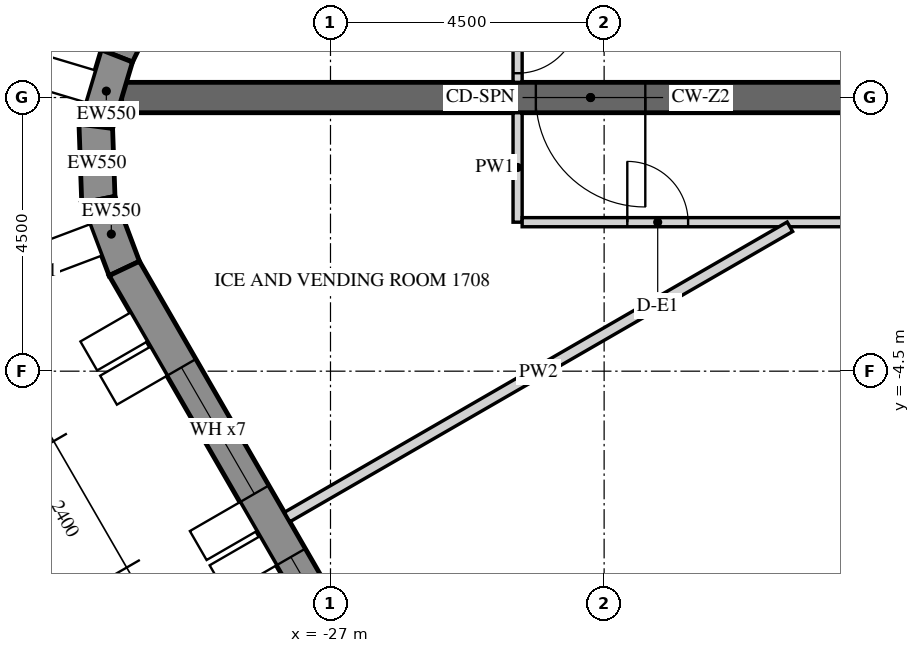
"""IFC4 building model, lengths in metres.
Left out: names, types, materials, properties, quantities, classifications, styles, units other than length and angle.
Written with IfcOpenShell. Run it as: python <this file> out.ifc"""

import sys

from ifc_helpers import new_model, si_unit, direction, frame, frame_2d, origin, place, context, subcontext, project, spatial, polyline, rectangle, outline, extrude, element, fill, save


model = new_model("IFC4")
c1 = context("Model", 3, precision=1e-05, world=origin(), true_north=direction((0.0, 1.0)))
c2 = subcontext(c1, "Body", "Model", "MODEL_VIEW")
j1 = project(units=[si_unit("LENGTHUNIT", "METRE"), si_unit("PLANEANGLEUNIT", "RADIAN")], contexts=[c1])
p1 = place(None, origin())
s1 = spatial("IfcSite", under=j1, at=p1, CompositionType="ELEMENT")
p2 = place(p1, origin())
s2 = spatial("IfcBuilding", under=s1, at=p2, CompositionType="ELEMENT")
p3 = place(p2, frame((0.0, 0.0, 215.1)))
s3 = spatial("IfcBuildingStorey", under=s2, at=p3, CompositionType="ELEMENT", Elevation=215.1)
p4 = place(p3, frame((-18.345, 25.633, -0.15), z_axis=(0.0, 0.0, 1.0), x_axis=(-0.43837181828, -0.898793718791, 0.0)))
e1 = element("IfcWall", 1, at=p4, inside=s3, PredefinedType="SOLIDWALL", context=c2, shape_type="SweptSolid", body=[
    extrude(outline(polyline([(-0.026, -0.275), (27.78, -0.275), (27.735, 0.275), (0.026, 0.275), (-0.026, -0.275)])), origin(), (0.0, 0.0, 1.0), 3.9),
])
p5 = place(p4, frame((1.879, 0.0, 1.05)))
e2 = element("IfcOpeningElement", 2, at=p5, cuts=e1, PredefinedType="OPENING", context=c2, shape_type="SweptSolid", body=[
    extrude(rectangle(XDim=2.4, YDim=2.4, at=frame_2d((1.2, 1.2))), frame((0.0, 0.285, 0.0), z_axis=(0.0, -1.0, 0.0), x_axis=(1.0, 0.0, 0.0)), (0.0, 0.0, 1.0), 0.57),
])
p6 = place(p4, frame((5.479, 0.0, 1.05)))
e3 = element("IfcOpeningElement", 3, at=p6, cuts=e1, PredefinedType="OPENING", context=c2, shape_type="SweptSolid", body=[
    extrude(rectangle(XDim=2.4, YDim=2.4, at=frame_2d((1.2, 1.2))), frame((0.0, 0.285, 0.0), z_axis=(0.0, -1.0, 0.0), x_axis=(1.0, 0.0, 0.0)), (0.0, 0.0, 1.0), 0.57),
])
p7 = place(p4, frame((9.079, 0.0, 1.05)))
e4 = element("IfcOpeningElement", 4, at=p7, cuts=e1, PredefinedType="OPENING", context=c2, shape_type="SweptSolid", body=[
    extrude(rectangle(XDim=2.4, YDim=2.4, at=frame_2d((1.2, 1.2))), frame((0.0, 0.285, 0.0), z_axis=(0.0, -1.0, 0.0), x_axis=(1.0, 0.0, 0.0)), (0.0, 0.0, 1.0), 0.57),
])
p8 = place(p4, frame((12.679, 0.0, 1.05)))
e5 = element("IfcOpeningElement", 5, at=p8, cuts=e1, PredefinedType="OPENING", context=c2, shape_type="SweptSolid", body=[
    extrude(rectangle(XDim=2.4, YDim=2.4, at=frame_2d((1.2, 1.2))), frame((0.0, 0.285, 0.0), z_axis=(0.0, -1.0, 0.0), x_axis=(1.0, 0.0, 0.0)), (0.0, 0.0, 1.0), 0.57),
])
p9 = place(p4, frame((16.279, 0.0, 1.05)))
e6 = element("IfcOpeningElement", 6, at=p9, cuts=e1, PredefinedType="OPENING", context=c2, shape_type="SweptSolid", body=[
    extrude(rectangle(XDim=2.4, YDim=2.4, at=frame_2d((1.2, 1.2))), frame((0.0, 0.285, 0.0), z_axis=(0.0, -1.0, 0.0), x_axis=(1.0, 0.0, 0.0)), (0.0, 0.0, 1.0), 0.57),
])
p10 = place(p4, frame((19.879, 0.0, 1.05)))
e7 = element("IfcOpeningElement", 7, at=p10, cuts=e1, PredefinedType="OPENING", context=c2, shape_type="SweptSolid", body=[
    extrude(rectangle(XDim=2.4, YDim=2.4, at=frame_2d((1.2, 1.2))), frame((0.0, 0.285, 0.0), z_axis=(0.0, -1.0, 0.0), x_axis=(1.0, 0.0, 0.0)), (0.0, 0.0, 1.0), 0.57),
])
p11 = place(p4, frame((23.479, 0.0, 1.05)))
e8 = element("IfcOpeningElement", 8, at=p11, cuts=e1, PredefinedType="OPENING", context=c2, shape_type="SweptSolid", body=[
    extrude(rectangle(XDim=2.4, YDim=2.4, at=frame_2d((1.2, 1.2))), frame((0.0, 0.285, 0.0), z_axis=(0.0, -1.0, 0.0), x_axis=(1.0, 0.0, 0.0)), (0.0, 0.0, 1.0), 0.57),
])
p12 = place(p3, frame((-30.513, 0.684, -0.15), z_axis=(0.0, 0.0, 1.0), x_axis=(-0.286736058109, -0.958009620505, 0.0)))
e9 = element("IfcWall", 9, at=p12, inside=s3, PredefinedType="SOLIDWALL", context=c2, shape_type="SweptSolid", body=[
    extrude(outline(polyline([(-0.022, -0.275), (1.253, -0.275), (1.163, 0.275), (0.022, 0.275), (-0.022, -0.275)])), origin(), (0.0, 0.0, 1.0), 3.9),
])
p13 = place(p3, frame((-30.86, -0.473, -0.15), z_axis=(0.0, 0.0, 1.0), x_axis=(0.03495638276, -0.999388838893, 0.0)))
e10 = element("IfcWall", 10, at=p13, inside=s3, PredefinedType="SOLIDWALL", context=c2, shape_type="SweptSolid", body=[
    extrude(outline(polyline([(-0.045, -0.275), (1.253, -0.275), (1.163, 0.275), (0.045, 0.275), (-0.045, -0.275)])), origin(), (0.0, 0.0, 1.0), 3.9),
])
p14 = place(p3, frame((-30.817, -1.681, -0.15), z_axis=(0.0, 0.0, 1.0), x_axis=(0.352850303963, -0.935679786569, 0.0)))
e11 = element("IfcWall", 11, at=p14, inside=s3, PredefinedType="SOLIDWALL", context=c2, shape_type="SweptSolid", body=[
    extrude(outline(polyline([(-0.045, -0.275), (1.23, -0.275), (1.186, 0.275), (0.045, 0.275), (-0.045, -0.275)])), origin(), (0.0, 0.0, 1.0), 3.9),
])
p15 = place(p3, frame((-30.391, -2.811, -0.15), z_axis=(0.0, 0.0, 1.0), x_axis=(0.499998569178, -0.866026229868, 0.0)))
e12 = element("IfcWall", 12, at=p15, inside=s3, PredefinedType="SOLIDWALL", context=c2, shape_type="SweptSolid", body=[
    extrude(outline(polyline([(-0.022, -0.275), (27.783, -0.275), (27.732, 0.275), (0.022, 0.275), (-0.022, -0.275)])), origin(), (0.0, 0.0, 1.0), 3.9),
])
p16 = place(p15, frame((1.879, 0.0, 1.05)))
e13 = element("IfcOpeningElement", 13, at=p16, cuts=e12, PredefinedType="OPENING", context=c2, shape_type="SweptSolid", body=[
    extrude(rectangle(XDim=2.4, YDim=2.4, at=frame_2d((1.2, 1.2))), frame((0.0, 0.285, 0.0), z_axis=(0.0, -1.0, 0.0), x_axis=(1.0, 0.0, 0.0)), (0.0, 0.0, 1.0), 0.57),
])
p17 = place(p15, frame((5.479, 0.0, 1.05)))
e14 = element("IfcOpeningElement", 14, at=p17, cuts=e12, PredefinedType="OPENING", context=c2, shape_type="SweptSolid", body=[
    extrude(rectangle(XDim=2.4, YDim=2.4, at=frame_2d((1.2, 1.2))), frame((0.0, 0.285, 0.0), z_axis=(0.0, -1.0, 0.0), x_axis=(1.0, 0.0, 0.0)), (0.0, 0.0, 1.0), 0.57),
])
p18 = place(p15, frame((9.079, 0.0, 1.05)))
e15 = element("IfcOpeningElement", 15, at=p18, cuts=e12, PredefinedType="OPENING", context=c2, shape_type="SweptSolid", body=[
    extrude(rectangle(XDim=2.4, YDim=2.4, at=frame_2d((1.2, 1.2))), frame((0.0, 0.285, 0.0), z_axis=(0.0, -1.0, 0.0), x_axis=(1.0, 0.0, 0.0)), (0.0, 0.0, 1.0), 0.57),
])
p19 = place(p15, frame((12.679, 0.0, 1.05)))
e16 = element("IfcOpeningElement", 16, at=p19, cuts=e12, PredefinedType="OPENING", context=c2, shape_type="SweptSolid", body=[
    extrude(rectangle(XDim=2.4, YDim=2.4, at=frame_2d((1.2, 1.2))), frame((0.0, 0.285, 0.0), z_axis=(0.0, -1.0, 0.0), x_axis=(1.0, 0.0, 0.0)), (0.0, 0.0, 1.0), 0.57),
])
p20 = place(p15, frame((16.279, 0.0, 1.05)))
e17 = element("IfcOpeningElement", 17, at=p20, cuts=e12, PredefinedType="OPENING", context=c2, shape_type="SweptSolid", body=[
    extrude(rectangle(XDim=2.4, YDim=2.4, at=frame_2d((1.2, 1.2))), frame((0.0, 0.285, 0.0), z_axis=(0.0, -1.0, 0.0), x_axis=(1.0, 0.0, 0.0)), (0.0, 0.0, 1.0), 0.57),
])
p21 = place(p15, frame((19.879, 0.0, 1.05)))
e18 = element("IfcOpeningElement", 18, at=p21, cuts=e12, PredefinedType="OPENING", context=c2, shape_type="SweptSolid", body=[
    extrude(rectangle(XDim=2.4, YDim=2.4, at=frame_2d((1.2, 1.2))), frame((0.0, 0.285, 0.0), z_axis=(0.0, -1.0, 0.0), x_axis=(1.0, 0.0, 0.0)), (0.0, 0.0, 1.0), 0.57),
])
p22 = place(p15, frame((23.479, 0.0, 1.05)))
e19 = element("IfcOpeningElement", 19, at=p22, cuts=e12, PredefinedType="OPENING", context=c2, shape_type="SweptSolid", body=[
    extrude(rectangle(XDim=2.4, YDim=2.4, at=frame_2d((1.2, 1.2))), frame((0.0, 0.285, 0.0), z_axis=(0.0, -1.0, 0.0), x_axis=(1.0, 0.0, 0.0)), (0.0, 0.0, 1.0), 0.57),
])
p23 = place(p3, frame((-15.011, 0.0, -0.15), z_axis=(0.0, 0.0, 1.0), x_axis=(-1.0, 0.0, 0.0)))
e20 = element("IfcWall", 20, at=p23, inside=s3, PredefinedType="SHEAR", context=c2, shape_type="SweptSolid", body=[
    extrude(rectangle(XDim=15.424, YDim=0.5, at=frame_2d((7.712, 0.0))), origin(), (0.0, 0.0, 1.0), 3.9),
])
p24 = place(p23, frame((6.812, 0.0, 0.15)))
e21 = element("IfcOpeningElement", 21, at=p24, cuts=e20, PredefinedType="OPENING", context=c2, shape_type="SweptSolid", body=[
    extrude(rectangle(XDim=1.8, YDim=2.4, at=frame_2d((0.9, 1.2))), frame((0.0, 0.26, 0.0), z_axis=(0.0, -1.0, 0.0), x_axis=(1.0, 0.0, 0.0)), (0.0, 0.0, 1.0), 0.52),
])
p25 = place(p3, frame((-23.923, 1.975, 0.0), z_axis=(0.0, 0.0, 1.0), x_axis=(0.0, -1.0, 0.0)))
e22 = element("IfcWall", 22, at=p25, inside=s3, PredefinedType="PARTITIONING", context=c2, shape_type="SweptSolid", body=[
    extrude(rectangle(XDim=1.725, YDim=0.15, at=frame_2d((0.863, 0.0))), origin(), (0.0, 0.0, 1.0), 2.988),
])
p26 = place(p25, frame((0.575, 0.0, 0.0)))
e23 = element("IfcOpeningElement", 23, at=p26, cuts=e22, PredefinedType="OPENING", context=c2, shape_type="SweptSolid", body=[
    extrude(rectangle(XDim=1.0, YDim=2.1, at=frame_2d((0.5, 1.05))), frame((0.0, 0.085, 0.0), z_axis=(0.0, -1.0, 0.0), x_axis=(1.0, 0.0, 0.0)), (0.0, 0.0, 1.0), 0.17),
])
p27 = place(p3, frame((-23.923, -0.25, 0.0), z_axis=(0.0, 0.0, 1.0), x_axis=(0.0, -1.0, 0.0)))
e24 = element("IfcWall", 24, at=p27, inside=s3, PredefinedType="PARTITIONING", context=c2, shape_type="SweptSolid", body=[
    extrude(rectangle(XDim=1.8, YDim=0.15, at=frame_2d((0.9, 0.0))), origin(), (0.0, 0.0, 1.0), 2.988),
])
p28 = place(p3, frame((-23.848, -2.05, 0.0), z_axis=(0.0, 0.0, 1.0), x_axis=(1.0, 0.0, 0.0)))
e25 = element("IfcWall", 25, at=p28, inside=s3, PredefinedType="PARTITIONING", context=c2, shape_type="SweptSolid", body=[
    extrude(rectangle(XDim=7.942, YDim=0.15, at=frame_2d((3.971, 0.0))), origin(), (0.0, 0.0, 1.0), 2.988),
])
p29 = place(p28, frame((1.729, 0.0, 0.0)))
e26 = element("IfcOpeningElement", 26, at=p29, cuts=e25, PredefinedType="OPENING", context=c2, shape_type="SweptSolid", body=[
    extrude(rectangle(XDim=1.0, YDim=2.1, at=frame_2d((0.5, 1.05))), frame((0.0, 0.085, 0.0), z_axis=(0.0, -1.0, 0.0), x_axis=(1.0, 0.0, 0.0)), (0.0, 0.0, 1.0), 0.17),
])
p30 = place(p3, frame((-27.713, -6.899, 0.0), z_axis=(0.0, 0.0, 1.0), x_axis=(0.866022070066, 0.500005774125, 0.0)))
e27 = element("IfcWall", 27, at=p30, inside=s3, PredefinedType="PARTITIONING", context=c2, shape_type="SweptSolid", body=[
    extrude(rectangle(XDim=9.548, YDim=0.18, at=frame_2d((4.774, 0.0))), origin(), (0.0, 0.0, 1.0), 2.988),
])
p31 = place(p16, frame((0.0, 0.205, 0.0)))
e28 = element("IfcWindow", 28, at=p31, inside=s3, PartitioningType="DOUBLE_PANEL_VERTICAL", PredefinedType="WINDOW", context=c2, shape_type="SweptSolid", body=[
    extrude(rectangle(XDim=2.4, YDim=2.4, at=frame_2d((1.2, 1.2))), frame((0.0, 0.03, 0.0), z_axis=(0.0, -1.0, 0.0), x_axis=(1.0, 0.0, 0.0)), (0.0, 0.0, 1.0), 0.06),
])
fill(e13, e28)
p32 = place(p17, frame((0.0, 0.205, 0.0)))
e29 = element("IfcWindow", 29, at=p32, inside=s3, PartitioningType="DOUBLE_PANEL_VERTICAL", PredefinedType="WINDOW", context=c2, shape_type="SweptSolid", body=[
    extrude(rectangle(XDim=2.4, YDim=2.4, at=frame_2d((1.2, 1.2))), frame((0.0, 0.03, 0.0), z_axis=(0.0, -1.0, 0.0), x_axis=(1.0, 0.0, 0.0)), (0.0, 0.0, 1.0), 0.06),
])
fill(e14, e29)
p33 = place(p24, origin())
e30 = element("IfcDoor", 30, at=p33, inside=s3, OperationType="DOUBLE_DOOR_SINGLE_SWING", PredefinedType="DOOR", context=c2, shape_type="SweptSolid", body=[
    extrude(rectangle(XDim=1.8, YDim=2.4, at=frame_2d((0.9, 1.2))), frame((0.0, 0.025, 0.0), z_axis=(0.0, -1.0, 0.0), x_axis=(1.0, 0.0, 0.0)), (0.0, 0.0, 1.0), 0.05),
])
fill(e21, e30)
p34 = place(p26, origin())
e31 = element("IfcDoor", 31, at=p34, inside=s3, OperationType="SINGLE_SWING_LEFT", PredefinedType="DOOR", context=c2, shape_type="SweptSolid", body=[
    extrude(rectangle(XDim=1.0, YDim=2.1, at=frame_2d((0.5, 1.05))), frame((0.0, 0.025, 0.0), z_axis=(0.0, -1.0, 0.0), x_axis=(1.0, 0.0, 0.0)), (0.0, 0.0, 1.0), 0.05),
])
fill(e23, e31)
p35 = place(p29, origin())
e32 = element("IfcDoor", 32, at=p35, inside=s3, OperationType="SINGLE_SWING_RIGHT", PredefinedType="DOOR", context=c2, shape_type="SweptSolid", body=[
    extrude(rectangle(XDim=1.0, YDim=2.1, at=frame_2d((0.5, 1.05))), frame((0.0, 0.025, 0.0), z_axis=(0.0, -1.0, 0.0), x_axis=(1.0, 0.0, 0.0)), (0.0, 0.0, 1.0), 0.05),
])
fill(e26, e32)
save(model, sys.argv[1])
